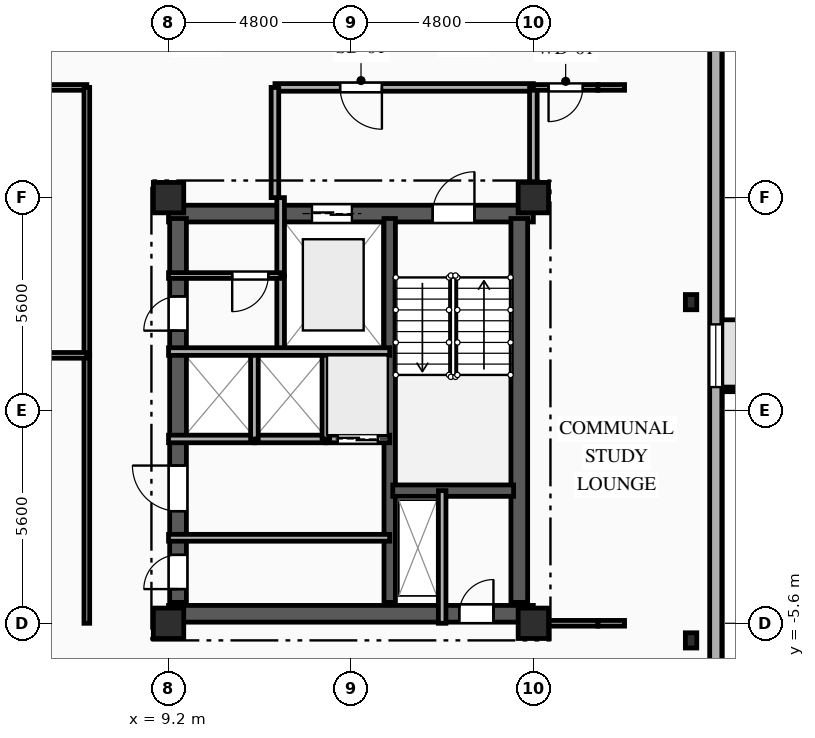
"""IFC4 building model, lengths in metres.
Left out: names, types, materials, properties, quantities, classifications, styles, units other than length and angle.
Written with IfcOpenShell. Run it as: python <this file> out.ifc"""

import sys

from ifc_helpers import new_model, si_unit, direction, frame, frame_2d, origin, origin_2d, place, context, subcontext, project, spatial, rectangle, i_section, extrude, element, fill, save


model = new_model("IFC4")
c1 = context("Model", 3, precision=1e-05, world=origin(), true_north=direction((0.0, 1.0)))
c2 = subcontext(c1, "Body", "Model", "MODEL_VIEW")
j1 = project(units=[si_unit("LENGTHUNIT", "METRE"), si_unit("PLANEANGLEUNIT", "RADIAN")], contexts=[c1])
p1 = place(None, origin())
s1 = spatial("IfcSite", under=j1, at=p1, CompositionType="ELEMENT")
p2 = place(p1, origin())
s2 = spatial("IfcBuilding", under=s1, at=p2, CompositionType="ELEMENT")
p3 = place(p2, frame((0.0, 0.0, 258.45)))
s3 = spatial("IfcBuildingStorey", under=s2, at=p3, CompositionType="ELEMENT", Elevation=258.45)
for number, where, z_axis, x_axis in (
    (1, (9.2, -5.6, 0.0), (0.0, 0.0, 1.0), (1.0, 0.0, 0.0)),
    (2, (9.2, 5.6, 0.0), (0.0, 0.0, 1.0), (1.0, 0.0, 0.0)),
    (3, (18.8, -5.6, 0.0), (0.0, 0.0, 1.0), (1.0, 0.0, 0.0)),
    (4, (18.8, 5.6, 0.0), (0.0, 0.0, 1.0), (1.0, 0.0, 0.0)),
):
    element("IfcColumn", number, at=place(p3, frame(where, z_axis=z_axis, x_axis=x_axis)), inside=s3, PredefinedType="COLUMN", context=c2, shape_type="SweptSolid", body=[
        extrude(rectangle(XDim=0.8, YDim=0.8, at=origin_2d()), origin(), (0.0, 0.0, 1.0), 3.35),
    ])
for number, where, z_axis, x_axis in (
    (5, (22.95, -6.05, 0.0), (0.0, 0.0, 1.0), (1.0, 0.0, 0.0)),
    (6, (22.95, 2.85, 0.0), (0.0, 0.0, 1.0), (1.0, 0.0, 0.0)),
):
    element("IfcColumn", number, at=place(p3, frame(where, z_axis=z_axis, x_axis=x_axis)), inside=s3, PredefinedType="COLUMN", context=c2, shape_type="SweptSolid", body=[
        extrude(i_section(OverallWidth=0.3, OverallDepth=0.4, WebThickness=0.013, FlangeThickness=0.024, FilletRadius=0.027, at=origin_2d()), origin(), (0.0, 0.0, 1.0), 3.35),
    ])
p4 = place(p3, frame((23.6, 12.4, 0.0), z_axis=(0.0, 0.0, 1.0), x_axis=(0.0, -1.0, 0.0)))
e7 = element("IfcWall", 7, at=p4, inside=s3, PredefinedType="SOLIDWALL", context=c2, shape_type="SweptSolid", body=[
    extrude(rectangle(XDim=28.0, YDim=0.32, at=frame_2d((14.0, 0.0))), origin(), (0.0, 0.0, 1.0), 3.03),
])
p5 = place(p4, frame((10.135, 0.0, 0.85)))
e8 = element("IfcOpeningElement", 8, at=p5, cuts=e7, PredefinedType="OPENING", context=c2, shape_type="SweptSolid", body=[
    extrude(rectangle(XDim=1.65, YDim=1.85, at=frame_2d((0.825, 0.925))), frame((0.0, 0.17, 0.0), z_axis=(0.0, -1.0, 0.0), x_axis=(1.0, 0.0, 0.0)), (0.0, 0.0, 1.0), 0.34),
])
p6 = place(p3, frame((9.2, 5.18, 0.0), z_axis=(0.0, 0.0, 1.0), x_axis=(1.0, 0.0, 0.0)))
e9 = element("IfcWall", 9, at=p6, inside=s3, PredefinedType="SHEAR", context=c2, shape_type="SweptSolid", body=[
    extrude(rectangle(XDim=9.6, YDim=0.44, at=frame_2d((4.8, 0.0))), origin(), (0.0, 0.0, 1.0), 3.03),
])
p7 = place(p6, frame((6.95, 0.0, 0.0)))
e10 = element("IfcOpeningElement", 10, at=p7, cuts=e9, PredefinedType="OPENING", context=c2, shape_type="SweptSolid", body=[
    extrude(rectangle(XDim=1.1, YDim=2.15, at=frame_2d((0.55, 1.075))), frame((0.0, 0.23, 0.0), z_axis=(0.0, -1.0, 0.0), x_axis=(1.0, 0.0, 0.0)), (0.0, 0.0, 1.0), 0.46),
])
p8 = place(p6, frame((3.775, 0.0, 0.0)))
e11 = element("IfcOpeningElement", 11, at=p8, cuts=e9, PredefinedType="OPENING", context=c2, shape_type="SweptSolid", body=[
    extrude(rectangle(XDim=1.05, YDim=2.1, at=frame_2d((0.525, 1.05))), frame((0.0, 0.23, 0.0), z_axis=(0.0, -1.0, 0.0), x_axis=(1.0, 0.0, 0.0)), (0.0, 0.0, 1.0), 0.46),
])
p9 = place(p3, frame((9.2, -5.35, 0.0), z_axis=(0.0, 0.0, 1.0), x_axis=(1.0, 0.0, 0.0)))
e12 = element("IfcWall", 12, at=p9, inside=s3, PredefinedType="SHEAR", context=c2, shape_type="SweptSolid", body=[
    extrude(rectangle(XDim=9.6, YDim=0.44, at=frame_2d((4.8, 0.0))), origin(), (0.0, 0.0, 1.0), 3.03),
])
p10 = place(p9, frame((7.65, 0.0, 0.0)))
e13 = element("IfcOpeningElement", 13, at=p10, cuts=e12, PredefinedType="OPENING", context=c2, shape_type="SweptSolid", body=[
    extrude(rectangle(XDim=0.9, YDim=2.1, at=frame_2d((0.45, 1.05))), frame((0.0, 0.23, 0.0), z_axis=(0.0, -1.0, 0.0), x_axis=(1.0, 0.0, 0.0)), (0.0, 0.0, 1.0), 0.46),
])
p11 = place(p3, frame((9.45, -5.05, 0.0), z_axis=(0.0, 0.0, 1.0), x_axis=(0.0, 1.0, 0.0)))
e14 = element("IfcWall", 14, at=p11, inside=s3, PredefinedType="SHEAR", context=c2, shape_type="SweptSolid", body=[
    extrude(rectangle(XDim=10.1, YDim=0.44, at=frame_2d((5.05, 0.0))), origin(), (0.0, 0.0, 1.0), 3.03),
])
p12 = place(p11, frame((7.15, 0.0, 0.0)))
e15 = element("IfcOpeningElement", 15, at=p12, cuts=e14, PredefinedType="OPENING", context=c2, shape_type="SweptSolid", body=[
    extrude(rectangle(XDim=0.9, YDim=2.1, at=frame_2d((0.45, 1.05))), frame((0.0, 0.23, 0.0), z_axis=(0.0, -1.0, 0.0), x_axis=(1.0, 0.0, 0.0)), (0.0, 0.0, 1.0), 0.46),
])
p13 = place(p11, frame((2.4, 0.0, 0.0)))
e16 = element("IfcOpeningElement", 16, at=p13, cuts=e14, PredefinedType="OPENING", context=c2, shape_type="SweptSolid", body=[
    extrude(rectangle(XDim=1.2, YDim=2.15, at=frame_2d((0.6, 1.075))), frame((0.0, 0.23, 0.0), z_axis=(0.0, -1.0, 0.0), x_axis=(1.0, 0.0, 0.0)), (0.0, 0.0, 1.0), 0.46),
])
p14 = place(p11, frame((0.35, 0.0, 0.0)))
e17 = element("IfcOpeningElement", 17, at=p14, cuts=e14, PredefinedType="OPENING", context=c2, shape_type="SweptSolid", body=[
    extrude(rectangle(XDim=0.9, YDim=2.1, at=frame_2d((0.45, 1.05))), frame((0.0, 0.23, 0.0), z_axis=(0.0, -1.0, 0.0), x_axis=(1.0, 0.0, 0.0)), (0.0, 0.0, 1.0), 0.46),
])
p15 = place(p3, frame((18.43, -5.05, 0.0), z_axis=(0.0, 0.0, 1.0), x_axis=(0.0, 1.0, 0.0)))
e18 = element("IfcWall", 18, at=p15, inside=s3, PredefinedType="SHEAR", context=c2, shape_type="SweptSolid", body=[
    extrude(rectangle(XDim=10.1, YDim=0.44, at=frame_2d((5.05, 0.0))), origin(), (0.0, 0.0, 1.0), 3.03),
])
p16 = place(p3, frame((15.02, -5.05, 0.0), z_axis=(0.0, 0.0, 1.0), x_axis=(0.0, 1.0, 0.0)))
e19 = element("IfcWall", 19, at=p16, inside=s3, PredefinedType="SHEAR", context=c2, shape_type="SweptSolid", body=[
    extrude(rectangle(XDim=10.1, YDim=0.3, at=frame_2d((5.05, 0.0))), origin(), (0.0, 0.0, 1.0), 3.03),
])
p17 = place(p3, frame((15.1, -2.11, 0.0), z_axis=(0.0, 0.0, 1.0), x_axis=(1.0, 0.0, 0.0)))
e20 = element("IfcWall", 20, at=p17, inside=s3, PredefinedType="SHEAR", context=c2, shape_type="SweptSolid", body=[
    extrude(rectangle(XDim=3.18, YDim=0.3, at=frame_2d((1.59, 0.0))), origin(), (0.0, 0.0, 1.0), 3.03),
])
p18 = place(p3, frame((16.4, -2.11, 0.0), z_axis=(0.0, 0.0, 1.0), x_axis=(0.0, -1.0, 0.0)))
e21 = element("IfcWall", 21, at=p18, inside=s3, PredefinedType="PARTITIONING", context=c2, shape_type="SweptSolid", body=[
    extrude(rectangle(XDim=3.49, YDim=0.2, at=frame_2d((1.745, 0.0))), origin(), (0.0, 0.0, 1.0), 3.03),
])
p19 = place(p3, frame((12.15, 3.55, 0.0), z_axis=(0.0, 0.0, 1.0), x_axis=(0.0, -1.0, 0.0)))
e22 = element("IfcWall", 22, at=p19, inside=s3, PredefinedType="PARTITIONING", context=c2, shape_type="SweptSolid", body=[
    extrude(rectangle(XDim=2.0, YDim=0.2, at=frame_2d((1.0, 0.0))), origin(), (0.0, 0.0, 1.0), 3.03),
])
p20 = place(p3, frame((12.15, 5.6, 0.0), z_axis=(0.0, 0.0, 1.0), x_axis=(0.0, -1.0, 0.0)))
e23 = element("IfcWall", 23, at=p20, inside=s3, PredefinedType="PARTITIONING", context=c2, shape_type="SweptSolid", body=[
    extrude(rectangle(XDim=2.05, YDim=0.2, at=frame_2d((1.025, 0.0))), origin(), (0.0, 0.0, 1.0), 3.03),
])
p21 = place(p3, frame((18.8, 8.5, 0.0), z_axis=(0.0, 0.0, 1.0), x_axis=(-1.0, 0.0, 0.0)))
e24 = element("IfcWall", 24, at=p21, inside=s3, PredefinedType="PARTITIONING", context=c2, shape_type="SweptSolid", body=[
    extrude(rectangle(XDim=6.8, YDim=0.2, at=frame_2d((3.4, 0.0))), origin(), (0.0, 0.0, 1.0), 3.03),
])
p22 = place(p21, frame((3.985, 0.0, 0.0)))
e25 = element("IfcOpeningElement", 25, at=p22, cuts=e24, PredefinedType="OPENING", context=c2, shape_type="SweptSolid", body=[
    extrude(rectangle(XDim=1.1, YDim=2.15, at=frame_2d((0.55, 1.075))), frame((0.0, 0.11, 0.0), z_axis=(0.0, -1.0, 0.0), x_axis=(1.0, 0.0, 0.0)), (0.0, 0.0, 1.0), 0.22),
])
p23 = place(p3, frame((12.0, 8.5, 0.0), z_axis=(0.0, 0.0, 1.0), x_axis=(0.0, -1.0, 0.0)))
e26 = element("IfcWall", 26, at=p23, inside=s3, PredefinedType="PARTITIONING", context=c2, shape_type="SweptSolid", body=[
    extrude(rectangle(XDim=2.9, YDim=0.2, at=frame_2d((1.45, 0.0))), origin(), (0.0, 0.0, 1.0), 3.03),
])
p24 = place(p3, frame((18.8, 5.6, 0.0), z_axis=(0.0, 0.0, 1.0), x_axis=(0.0, 1.0, 0.0)))
e27 = element("IfcWall", 27, at=p24, inside=s3, PredefinedType="PARTITIONING", context=c2, shape_type="SweptSolid", body=[
    extrude(rectangle(XDim=2.9, YDim=0.2, at=frame_2d((1.45, 0.0))), origin(), (0.0, 0.0, 1.0), 2.655),
])
p25 = place(p3, frame((12.15, 3.55, 0.0), z_axis=(0.0, 0.0, 1.0), x_axis=(-1.0, 0.0, 0.0)))
e28 = element("IfcWall", 28, at=p25, inside=s3, PredefinedType="PARTITIONING", context=c2, shape_type="SweptSolid", body=[
    extrude(rectangle(XDim=2.95, YDim=0.15, at=frame_2d((1.475, 0.0))), origin(), (0.0, 0.0, 1.0), 3.03),
])
p26 = place(p25, frame((0.325, 0.0, 0.0)))
e29 = element("IfcOpeningElement", 29, at=p26, cuts=e28, PredefinedType="OPENING", context=c2, shape_type="SweptSolid", body=[
    extrude(rectangle(XDim=0.95, YDim=2.1, at=frame_2d((0.475, 1.05))), frame((0.0, 0.085, 0.0), z_axis=(0.0, -1.0, 0.0), x_axis=(1.0, 0.0, 0.0)), (0.0, 0.0, 1.0), 0.17),
])
p27 = place(p3, frame((9.2, -3.35, 0.0), z_axis=(0.0, 0.0, 1.0), x_axis=(1.0, 0.0, 0.0)))
e30 = element("IfcWall", 30, at=p27, inside=s3, PredefinedType="PARTITIONING", context=c2, shape_type="SweptSolid", body=[
    extrude(rectangle(XDim=5.82, YDim=0.18, at=frame_2d((2.91, 0.0))), origin(), (0.0, 0.0, 1.0), 2.745),
])
p28 = place(p3, frame((11.46, -0.75, 0.0), z_axis=(0.0, 0.0, 1.0), x_axis=(-1.0, 0.0, 0.0)))
e31 = element("IfcWall", 31, at=p28, inside=s3, PredefinedType="PARTITIONING", context=c2, shape_type="SweptSolid", body=[
    extrude(rectangle(XDim=2.26, YDim=0.2, at=frame_2d((1.13, 0.0))), origin(), (0.0, 0.0, 1.0), 3.03),
])
p29 = place(p3, frame((13.34, -0.75, 0.0), z_axis=(0.0, 0.0, 1.0), x_axis=(-1.0, 0.0, 0.0)))
e32 = element("IfcWall", 32, at=p29, inside=s3, PredefinedType="PARTITIONING", context=c2, shape_type="SweptSolid", body=[
    extrude(rectangle(XDim=1.88, YDim=0.2, at=frame_2d((0.94, 0.0))), origin(), (0.0, 0.0, 1.0), 3.03),
])
p30 = place(p3, frame((15.02, -0.75, 0.0), z_axis=(0.0, 0.0, 1.0), x_axis=(-1.0, 0.0, 0.0)))
e33 = element("IfcWall", 33, at=p30, inside=s3, PredefinedType="PARTITIONING", context=c2, shape_type="SweptSolid", body=[
    extrude(rectangle(XDim=1.68, YDim=0.2, at=frame_2d((0.84, 0.0))), origin(), (0.0, 0.0, 1.0), 3.03),
])
p31 = place(p30, frame((0.315, 0.0, 0.0)))
e34 = element("IfcOpeningElement", 34, at=p31, cuts=e33, PredefinedType="OPENING", context=c2, shape_type="SweptSolid", body=[
    extrude(rectangle(XDim=1.05, YDim=2.1, at=frame_2d((0.525, 1.05))), frame((0.0, 0.11, 0.0), z_axis=(0.0, -1.0, 0.0), x_axis=(1.0, 0.0, 0.0)), (0.0, 0.0, 1.0), 0.22),
])
for number, where, z_axis, x_axis in (
    (35, (11.46, -0.75, 0.0), (0.0, 0.0, 1.0), (0.0, 1.0, 0.0)),
    (36, (13.34, -0.75, 0.0), (0.0, 0.0, 1.0), (0.0, 1.0, 0.0)),
):
    element("IfcWall", number, at=place(p3, frame(where, z_axis=z_axis, x_axis=x_axis)), inside=s3, PredefinedType="PARTITIONING", context=c2, shape_type="SweptSolid", body=[
        extrude(rectangle(XDim=2.3, YDim=0.2, at=frame_2d((1.15, 0.0))), origin(), (0.0, 0.0, 1.0), 3.03),
    ])
p32 = place(p3, frame((20.5, 8.5, 0.0), z_axis=(0.0, 0.0, 1.0), x_axis=(-1.0, 0.0, 0.0)))
e37 = element("IfcWall", 37, at=p32, inside=s3, PredefinedType="PARTITIONING", context=c2, shape_type="SweptSolid", body=[
    extrude(rectangle(XDim=1.7, YDim=0.15, at=frame_2d((0.85, 0.0))), origin(), (0.0, 0.0, 1.0), 3.03),
])
p33 = place(p32, frame((0.4, 0.0, 0.0)))
e38 = element("IfcOpeningElement", 38, at=p33, cuts=e37, PredefinedType="OPENING", context=c2, shape_type="SweptSolid", body=[
    extrude(rectangle(XDim=0.9, YDim=2.1, at=frame_2d((0.45, 1.05))), frame((0.0, 0.085, 0.0), z_axis=(0.0, -1.0, 0.0), x_axis=(1.0, 0.0, 0.0)), (0.0, 0.0, 1.0), 0.17),
])
p34 = place(p3, frame((21.2, 8.5, 0.0), z_axis=(0.0, 0.0, 1.0), x_axis=(-1.0, 0.0, 0.0)))
e39 = element("IfcWall", 39, at=p34, inside=s3, PredefinedType="PARTITIONING", context=c2, shape_type="SweptSolid", body=[
    extrude(rectangle(XDim=0.7, YDim=0.15, at=frame_2d((0.35, 0.0))), origin(), (0.0, 0.0, 1.0), 3.03),
])
p35 = place(p3, frame((7.05, 8.5, 0.0), z_axis=(0.0, 0.0, 1.0), x_axis=(-1.0, 0.0, 0.0)))
e40 = element("IfcWall", 40, at=p35, inside=s3, PredefinedType="PARTITIONING", context=c2, shape_type="SweptSolid", body=[
    extrude(rectangle(XDim=7.05, YDim=0.15, at=frame_2d((3.525, 0.0))), origin(), (0.0, 0.0, 1.0), 3.03),
])
p36 = place(p3, frame((18.8, -5.6, 0.0), z_axis=(0.0, 0.0, 1.0), x_axis=(1.0, 0.0, 0.0)))
e41 = element("IfcWall", 41, at=p36, inside=s3, PredefinedType="PARTITIONING", context=c2, shape_type="SweptSolid", body=[
    extrude(rectangle(XDim=1.7, YDim=0.15, at=frame_2d((0.85, 0.0))), origin(), (0.0, 0.0, 1.0), 3.03),
])
p37 = place(p3, frame((20.5, -5.6, 0.0), z_axis=(0.0, 0.0, 1.0), x_axis=(1.0, 0.0, 0.0)))
e42 = element("IfcWall", 42, at=p37, inside=s3, PredefinedType="PARTITIONING", context=c2, shape_type="SweptSolid", body=[
    extrude(rectangle(XDim=0.7, YDim=0.15, at=frame_2d((0.35, 0.0))), origin(), (0.0, 0.0, 1.0), 3.03),
])
for number, where, z_axis, x_axis in (
    (43, (7.05, -5.6, 0.0), (0.0, 0.0, 1.0), (0.0, 1.0, 0.0)),
    (44, (7.05, 1.45, 0.0), (0.0, 0.0, 1.0), (0.0, 1.0, 0.0)),
):
    element("IfcWall", number, at=place(p3, frame(where, z_axis=z_axis, x_axis=x_axis)), inside=s3, PredefinedType="PARTITIONING", context=c2, shape_type="SweptSolid", body=[
        extrude(rectangle(XDim=7.05, YDim=0.15, at=frame_2d((3.525, 0.0))), origin(), (0.0, 0.0, 1.0), 3.03),
    ])
p38 = place(p3, frame((-7.05, 1.45, 0.0), z_axis=(0.0, 0.0, 1.0), x_axis=(1.0, 0.0, 0.0)))
e45 = element("IfcWall", 45, at=p38, inside=s3, PredefinedType="PARTITIONING", context=c2, shape_type="SweptSolid", body=[
    extrude(rectangle(XDim=14.1, YDim=0.15, at=frame_2d((7.05, 0.0))), origin(), (0.0, 0.0, 1.0), 3.03),
])
p39 = place(p3, frame((9.2, 1.55, 0.0), z_axis=(0.0, 0.0, 1.0), x_axis=(1.0, 0.0, 0.0)))
e46 = element("IfcWall", 46, at=p39, inside=s3, PredefinedType="PARTITIONING", context=c2, shape_type="SweptSolid", body=[
    extrude(rectangle(XDim=5.82, YDim=0.2, at=frame_2d((2.91, 0.0))), origin(), (0.0, 0.0, 1.0), 3.03),
])
p40 = place(p5, origin())
e47 = element("IfcWindow", 47, at=p40, inside=s3, PartitioningType="SINGLE_PANEL", PredefinedType="WINDOW", context=c2, shape_type="SweptSolid", body=[
    extrude(rectangle(XDim=1.65, YDim=1.85, at=frame_2d((0.825, 0.925))), frame((0.0, 0.03, 0.0), z_axis=(0.0, -1.0, 0.0), x_axis=(1.0, 0.0, 0.0)), (0.0, 0.0, 1.0), 0.06),
])
fill(e8, e47)
p41 = place(p7, origin())
e48 = element("IfcDoor", 48, at=p41, inside=s3, OperationType="SINGLE_SWING_RIGHT", PredefinedType="DOOR", context=c2, shape_type="SweptSolid", body=[
    extrude(rectangle(XDim=1.1, YDim=2.15, at=frame_2d((0.55, 1.075))), frame((0.0, 0.025, 0.0), z_axis=(0.0, -1.0, 0.0), x_axis=(1.0, 0.0, 0.0)), (0.0, 0.0, 1.0), 0.05),
])
fill(e10, e48)
p42 = place(p8, origin())
e49 = element("IfcDoor", 49, at=p42, inside=s3, OperationType="DOUBLE_DOOR_SLIDING", PredefinedType="DOOR", context=c2, shape_type="SweptSolid", body=[
    extrude(rectangle(XDim=1.05, YDim=2.1, at=frame_2d((0.525, 1.05))), frame((0.0, 0.025, 0.0), z_axis=(0.0, -1.0, 0.0), x_axis=(1.0, 0.0, 0.0)), (0.0, 0.0, 1.0), 0.05),
])
fill(e11, e49)
p43 = place(p10, origin())
e50 = element("IfcDoor", 50, at=p43, inside=s3, OperationType="SINGLE_SWING_RIGHT", PredefinedType="DOOR", context=c2, shape_type="SweptSolid", body=[
    extrude(rectangle(XDim=0.9, YDim=2.1, at=frame_2d((0.45, 1.05))), frame((0.0, 0.025, 0.0), z_axis=(0.0, -1.0, 0.0), x_axis=(1.0, 0.0, 0.0)), (0.0, 0.0, 1.0), 0.05),
])
fill(e13, e50)
p44 = place(p22, origin())
e51 = element("IfcDoor", 51, at=p44, inside=s3, OperationType="SINGLE_SWING_LEFT", PredefinedType="DOOR", context=c2, shape_type="SweptSolid", body=[
    extrude(rectangle(XDim=1.1, YDim=2.15, at=frame_2d((0.55, 1.075))), frame((0.0, 0.025, 0.0), z_axis=(0.0, -1.0, 0.0), x_axis=(1.0, 0.0, 0.0)), (0.0, 0.0, 1.0), 0.05),
])
fill(e25, e51)
p45 = place(p26, origin())
e52 = element("IfcDoor", 52, at=p45, inside=s3, OperationType="SINGLE_SWING_RIGHT", PredefinedType="DOOR", context=c2, shape_type="SweptSolid", body=[
    extrude(rectangle(XDim=0.95, YDim=2.1, at=frame_2d((0.475, 1.05))), frame((0.0, 0.025, 0.0), z_axis=(0.0, -1.0, 0.0), x_axis=(1.0, 0.0, 0.0)), (0.0, 0.0, 1.0), 0.05),
])
fill(e29, e52)
p46 = place(p12, origin())
e53 = element("IfcDoor", 53, at=p46, inside=s3, OperationType="SINGLE_SWING_LEFT", PredefinedType="DOOR", context=c2, shape_type="SweptSolid", body=[
    extrude(rectangle(XDim=0.9, YDim=2.1, at=frame_2d((0.45, 1.05))), frame((0.0, 0.025, 0.0), z_axis=(0.0, -1.0, 0.0), x_axis=(1.0, 0.0, 0.0)), (0.0, 0.0, 1.0), 0.05),
])
fill(e15, e53)
p47 = place(p31, origin())
e54 = element("IfcDoor", 54, at=p47, inside=s3, OperationType="DOUBLE_DOOR_SLIDING", PredefinedType="DOOR", context=c2, shape_type="SweptSolid", body=[
    extrude(rectangle(XDim=1.05, YDim=2.1, at=frame_2d((0.525, 1.05))), frame((0.0, 0.025, 0.0), z_axis=(0.0, -1.0, 0.0), x_axis=(1.0, 0.0, 0.0)), (0.0, 0.0, 1.0), 0.05),
])
fill(e34, e54)
p48 = place(p13, origin())
e55 = element("IfcDoor", 55, at=p48, inside=s3, OperationType="SINGLE_SWING_RIGHT", PredefinedType="DOOR", context=c2, shape_type="SweptSolid", body=[
    extrude(rectangle(XDim=1.2, YDim=2.15, at=frame_2d((0.6, 1.075))), frame((0.0, 0.025, 0.0), z_axis=(0.0, -1.0, 0.0), x_axis=(1.0, 0.0, 0.0)), (0.0, 0.0, 1.0), 0.05),
])
fill(e16, e55)
p49 = place(p14, origin())
e56 = element("IfcDoor", 56, at=p49, inside=s3, OperationType="SINGLE_SWING_LEFT", PredefinedType="DOOR", context=c2, shape_type="SweptSolid", body=[
    extrude(rectangle(XDim=0.9, YDim=2.1, at=frame_2d((0.45, 1.05))), frame((0.0, 0.025, 0.0), z_axis=(0.0, -1.0, 0.0), x_axis=(1.0, 0.0, 0.0)), (0.0, 0.0, 1.0), 0.05),
])
fill(e17, e56)
p50 = place(p33, origin())
e57 = element("IfcDoor", 57, at=p50, inside=s3, OperationType="SINGLE_SWING_RIGHT", PredefinedType="DOOR", context=c2, shape_type="SweptSolid", body=[
    extrude(rectangle(XDim=0.9, YDim=2.1, at=frame_2d((0.45, 1.05))), frame((0.0, 0.025, 0.0), z_axis=(0.0, -1.0, 0.0), x_axis=(1.0, 0.0, 0.0)), (0.0, 0.0, 1.0), 0.05),
])
fill(e38, e57)
save(model, sys.argv[1])
